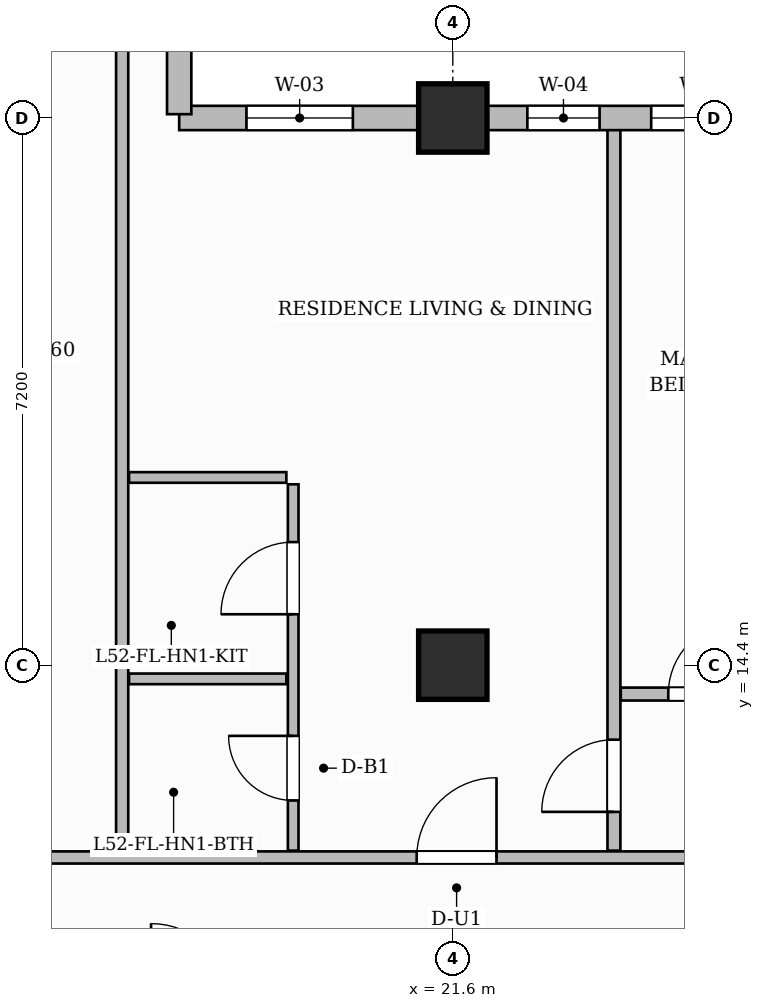
"""IFC4 building model, lengths in metres.
Left out: names, types, materials, properties, quantities, classifications, styles, units other than length and angle.
Written with IfcOpenShell. Run it as: python <this file> out.ifc"""

import sys

from ifc_helpers import new_model, si_unit, direction, frame, frame_2d, origin, origin_2d, place, context, subcontext, project, spatial, rectangle, extrude, source, transform, mapped, element, fill, save


model = new_model("IFC4")
c1 = context("Model", 3, precision=1e-05, world=origin(), true_north=direction((0.0, 1.0)))
c2 = subcontext(c1, "Body", "Model", "MODEL_VIEW")
j1 = project(units=[si_unit("LENGTHUNIT", "METRE"), si_unit("PLANEANGLEUNIT", "RADIAN")], contexts=[c1])
p1 = place(None, origin())
s1 = spatial("IfcSite", under=j1, at=p1, CompositionType="ELEMENT")
p2 = place(p1, origin())
s2 = spatial("IfcBuilding", under=s1, at=p2, CompositionType="ELEMENT")
p3 = place(p2, frame((0.0, 0.0, 209.6)))
s3 = spatial("IfcBuildingStorey", under=s2, at=p3, CompositionType="ELEMENT", Elevation=209.6)
m1 = source(origin(), c2, "Body", "SweptSolid", [
    extrude(rectangle(XDim=0.9, YDim=0.9, at=origin_2d()), origin(), (0.0, 0.0, 1.0), 3.85),
])
for number, where, z_axis, x_axis in (
    (1, (21.6, 14.4, 0.0), (0.0, 0.0, 1.0), (1.0, 0.0, 0.0)),
    (2, (21.6, 21.6, 0.0), (0.0, 0.0, 1.0), (1.0, 0.0, 0.0)),
):
    element("IfcColumn", number, at=place(p3, frame(where, z_axis=z_axis, x_axis=x_axis)), inside=s3, PredefinedType="COLUMN", context=c2, shape_type="MappedRepresentation", body=[
        mapped(m1, transform((0.0, 0.0, 0.0), scale=1.0)),
    ])
p4 = place(p3, frame((14.568, 11.87, 0.0), z_axis=(0.0, 0.0, 1.0), x_axis=(1.0, 0.0, 0.0)))
e3 = element("IfcWall", 3, at=p4, inside=s3, PredefinedType="PARTITIONING", context=c2, shape_type="SweptSolid", body=[
    extrude(rectangle(XDim=15.542, YDim=0.16, at=frame_2d((7.771, 0.0))), origin(), (0.0, 0.0, 1.0), 3.6),
])
p5 = place(p4, frame((6.557, 0.0, 0.0)))
e4 = element("IfcOpeningElement", 4, at=p5, cuts=e3, PredefinedType="OPENING", context=c2, shape_type="SweptSolid", body=[
    extrude(rectangle(XDim=1.05, YDim=2.25, at=frame_2d((0.525, 1.125))), frame((0.0, 0.09, 0.0), z_axis=(0.0, -1.0, 0.0), x_axis=(1.0, 0.0, 0.0)), (0.0, 0.0, 1.0), 0.18),
])
p6 = place(p3, frame((17.25, 11.96, 0.0), z_axis=(0.0, 0.0, 1.0), x_axis=(0.0, 1.0, 0.0)))
e5 = element("IfcWall", 5, at=p6, inside=s3, PredefinedType="PARTITIONING", context=c2, shape_type="SweptSolid", body=[
    extrude(rectangle(XDim=13.15, YDim=0.16, at=frame_2d((6.575, 0.0))), origin(), (0.0, 0.0, 1.0), 3.6),
])
p7 = place(p3, frame((19.5, 11.96, 0.0), z_axis=(0.0, 0.0, 1.0), x_axis=(0.0, 1.0, 0.0)))
e6 = element("IfcWall", 6, at=p7, inside=s3, PredefinedType="PARTITIONING", context=c2, shape_type="SweptSolid", body=[
    extrude(rectangle(XDim=4.82, YDim=0.14, at=frame_2d((2.41, 0.0))), origin(), (0.0, 0.0, 1.0), 3.6),
])
p8 = place(p7, frame((0.66, 0.0, 0.0)))
e7 = element("IfcOpeningElement", 7, at=p8, cuts=e6, PredefinedType="OPENING", context=c2, shape_type="SweptSolid", body=[
    extrude(rectangle(XDim=0.85, YDim=2.1, at=frame_2d((0.425, 1.05))), frame((0.0, 0.08, 0.0), z_axis=(0.0, -1.0, 0.0), x_axis=(1.0, 0.0, 0.0)), (0.0, 0.0, 1.0), 0.16),
])
p9 = place(p7, frame((3.11, 0.0, 0.0)))
e8 = element("IfcOpeningElement", 8, at=p9, cuts=e6, PredefinedType="OPENING", context=c2, shape_type="SweptSolid", body=[
    extrude(rectangle(XDim=0.95, YDim=2.15, at=frame_2d((0.475, 1.075))), frame((0.0, 0.08, 0.0), z_axis=(0.0, -1.0, 0.0), x_axis=(1.0, 0.0, 0.0)), (0.0, 0.0, 1.0), 0.16),
])
p10 = place(p3, frame((17.34, 14.22, 0.0), z_axis=(0.0, 0.0, 1.0), x_axis=(1.0, 0.0, 0.0)))
e9 = element("IfcWall", 9, at=p10, inside=s3, PredefinedType="PARTITIONING", context=c2, shape_type="SweptSolid", body=[
    extrude(rectangle(XDim=2.07, YDim=0.14, at=frame_2d((1.035, 0.0))), origin(), (0.0, 0.0, 1.0), 3.085),
])
p11 = place(p3, frame((17.34, 16.87, 0.0), z_axis=(0.0, 0.0, 1.0), x_axis=(1.0, 0.0, 0.0)))
e10 = element("IfcWall", 10, at=p11, inside=s3, PredefinedType="PARTITIONING", context=c2, shape_type="SweptSolid", body=[
    extrude(rectangle(XDim=2.07, YDim=0.14, at=frame_2d((1.035, 0.0))), origin(), (0.0, 0.0, 1.0), 3.6),
])
p12 = place(p3, frame((23.72, 11.96, 0.0), z_axis=(0.0, 0.0, 1.0), x_axis=(0.0, 1.0, 0.0)))
e11 = element("IfcWall", 11, at=p12, inside=s3, PredefinedType="PARTITIONING", context=c2, shape_type="SweptSolid", body=[
    extrude(rectangle(XDim=9.5, YDim=0.17, at=frame_2d((4.75, 0.0))), origin(), (0.0, 0.0, 1.0), 3.6),
])
p13 = place(p12, frame((0.51, 0.0, 0.0)))
e12 = element("IfcOpeningElement", 12, at=p13, cuts=e11, PredefinedType="OPENING", context=c2, shape_type="SweptSolid", body=[
    extrude(rectangle(XDim=0.95, YDim=2.15, at=frame_2d((0.475, 1.075))), frame((0.0, 0.095, 0.0), z_axis=(0.0, -1.0, 0.0), x_axis=(1.0, 0.0, 0.0)), (0.0, 0.0, 1.0), 0.19),
])
p14 = place(p3, frame((23.81, 14.02, 0.0), z_axis=(0.0, 0.0, 1.0), x_axis=(1.0, 0.0, 0.0)))
e13 = element("IfcWall", 13, at=p14, inside=s3, PredefinedType="PARTITIONING", context=c2, shape_type="SweptSolid", body=[
    extrude(rectangle(XDim=6.3, YDim=0.17, at=frame_2d((3.15, 0.0))), origin(), (0.0, 0.0, 1.0), 3.6),
])
p15 = place(p14, frame((0.625, 0.0, 0.0)))
e14 = element("IfcOpeningElement", 14, at=p15, cuts=e13, PredefinedType="OPENING", context=c2, shape_type="SweptSolid", body=[
    extrude(rectangle(XDim=0.95, YDim=2.15, at=frame_2d((0.475, 1.075))), frame((0.0, 0.095, 0.0), z_axis=(0.0, -1.0, 0.0), x_axis=(1.0, 0.0, 0.0)), (0.0, 0.0, 1.0), 0.19),
])
p16 = place(p14, frame((2.815, 0.0, 0.0)))
e15 = element("IfcOpeningElement", 15, at=p16, cuts=e13, PredefinedType="OPENING", context=c2, shape_type="SweptSolid", body=[
    extrude(rectangle(XDim=0.95, YDim=2.15, at=frame_2d((0.475, 1.075))), frame((0.0, 0.095, 0.0), z_axis=(0.0, -1.0, 0.0), x_axis=(1.0, 0.0, 0.0)), (0.0, 0.0, 1.0), 0.19),
])
p17 = place(p3, frame((18.0, 21.6, 0.0), z_axis=(0.0, 0.0, 1.0), x_axis=(1.0, 0.0, 0.0)))
e16 = element("IfcWall", 16, at=p17, inside=s3, PredefinedType="SOLIDWALL", context=c2, shape_type="SweptSolid", body=[
    extrude(rectangle(XDim=31.8, YDim=0.32, at=frame_2d((15.9, 0.0))), origin(), (0.0, 0.0, 1.0), 3.085),
])
p18 = place(p17, frame((0.885, 0.0, 0.8)))
e17 = element("IfcOpeningElement", 17, at=p18, cuts=e16, PredefinedType="OPENING", context=c2, shape_type="SweptSolid", body=[
    extrude(rectangle(XDim=1.4, YDim=1.85, at=frame_2d((0.7, 0.925))), frame((0.0, 0.17, 0.0), z_axis=(0.0, -1.0, 0.0), x_axis=(1.0, 0.0, 0.0)), (0.0, 0.0, 1.0), 0.34),
])
p19 = place(p17, frame((4.581, 0.0, 0.8)))
e18 = element("IfcOpeningElement", 18, at=p19, cuts=e16, PredefinedType="OPENING", context=c2, shape_type="SweptSolid", body=[
    extrude(rectangle(XDim=0.95, YDim=1.75, at=frame_2d((0.475, 0.875))), frame((0.0, 0.17, 0.0), z_axis=(0.0, -1.0, 0.0), x_axis=(1.0, 0.0, 0.0)), (0.0, 0.0, 1.0), 0.34),
])
p20 = place(p17, frame((6.21, 0.0, 0.8)))
e19 = element("IfcOpeningElement", 19, at=p20, cuts=e16, PredefinedType="OPENING", context=c2, shape_type="SweptSolid", body=[
    extrude(rectangle(XDim=1.4, YDim=1.85, at=frame_2d((0.7, 0.925))), frame((0.0, 0.17, 0.0), z_axis=(0.0, -1.0, 0.0), x_axis=(1.0, 0.0, 0.0)), (0.0, 0.0, 1.0), 0.34),
])
p21 = place(p17, frame((8.48, 0.0, 0.8)))
e20 = element("IfcOpeningElement", 20, at=p21, cuts=e16, PredefinedType="OPENING", context=c2, shape_type="SweptSolid", body=[
    extrude(rectangle(XDim=1.15, YDim=1.8, at=frame_2d((0.575, 0.9))), frame((0.0, 0.17, 0.0), z_axis=(0.0, -1.0, 0.0), x_axis=(1.0, 0.0, 0.0)), (0.0, 0.0, 1.0), 0.34),
])
p22 = place(p17, frame((12.95, 0.0, 0.8)))
e21 = element("IfcOpeningElement", 21, at=p22, cuts=e16, PredefinedType="OPENING", context=c2, shape_type="SweptSolid", body=[
    extrude(rectangle(XDim=1.8, YDim=1.85, at=frame_2d((0.9, 0.925))), frame((0.0, 0.17, 0.0), z_axis=(0.0, -1.0, 0.0), x_axis=(1.0, 0.0, 0.0)), (0.0, 0.0, 1.0), 0.34),
])
p23 = place(p17, frame((18.596, 0.0, 0.8)))
e22 = element("IfcOpeningElement", 22, at=p23, cuts=e16, PredefinedType="OPENING", context=c2, shape_type="SweptSolid", body=[
    extrude(rectangle(XDim=1.8, YDim=1.85, at=frame_2d((0.9, 0.925))), frame((0.0, 0.17, 0.0), z_axis=(0.0, -1.0, 0.0), x_axis=(1.0, 0.0, 0.0)), (0.0, 0.0, 1.0), 0.34),
])
p24 = place(p17, frame((21.729, 0.0, 0.8)))
e23 = element("IfcOpeningElement", 23, at=p24, cuts=e16, PredefinedType="OPENING", context=c2, shape_type="SweptSolid", body=[
    extrude(rectangle(XDim=1.15, YDim=1.8, at=frame_2d((0.575, 0.9))), frame((0.0, 0.17, 0.0), z_axis=(0.0, -1.0, 0.0), x_axis=(1.0, 0.0, 0.0)), (0.0, 0.0, 1.0), 0.34),
])
p25 = place(p17, frame((25.121, 0.0, 0.8)))
e24 = element("IfcOpeningElement", 24, at=p25, cuts=e16, PredefinedType="OPENING", context=c2, shape_type="SweptSolid", body=[
    extrude(rectangle(XDim=0.95, YDim=1.75, at=frame_2d((0.475, 0.875))), frame((0.0, 0.17, 0.0), z_axis=(0.0, -1.0, 0.0), x_axis=(1.0, 0.0, 0.0)), (0.0, 0.0, 1.0), 0.34),
])
p26 = place(p17, frame((27.804, 0.0, 0.8)))
e25 = element("IfcOpeningElement", 25, at=p26, cuts=e16, PredefinedType="OPENING", context=c2, shape_type="SweptSolid", body=[
    extrude(rectangle(XDim=1.8, YDim=1.85, at=frame_2d((0.9, 0.925))), frame((0.0, 0.17, 0.0), z_axis=(0.0, -1.0, 0.0), x_axis=(1.0, 0.0, 0.0)), (0.0, 0.0, 1.0), 0.34),
])
p27 = place(p3, frame((18.0, 21.65, 0.0), z_axis=(0.0, 0.0, 1.0), x_axis=(0.0, 1.0, 0.0)))
e26 = element("IfcWall", 26, at=p27, inside=s3, PredefinedType="SOLIDWALL", context=c2, shape_type="SweptSolid", body=[
    extrude(rectangle(XDim=25.1, YDim=0.32, at=frame_2d((12.55, 0.0))), origin(), (0.0, 0.0, 1.0), 3.6),
])
p28 = place(p27, frame((12.706, 0.0, 0.0)))
e27 = element("IfcOpeningElement", 27, at=p28, cuts=e26, PredefinedType="OPENING", context=c2, shape_type="SweptSolid", body=[
    extrude(rectangle(XDim=1.2, YDim=2.2, at=frame_2d((0.6, 1.1))), frame((0.0, 0.17, 0.0), z_axis=(0.0, -1.0, 0.0), x_axis=(1.0, 0.0, 0.0)), (0.0, 0.0, 1.0), 0.34),
])
p29 = place(p27, frame((1.89, 0.0, 0.8)))
e28 = element("IfcOpeningElement", 28, at=p29, cuts=e26, PredefinedType="OPENING", context=c2, shape_type="SweptSolid", body=[
    extrude(rectangle(XDim=1.8, YDim=1.85, at=frame_2d((0.9, 0.925))), frame((0.0, 0.17, 0.0), z_axis=(0.0, -1.0, 0.0), x_axis=(1.0, 0.0, 0.0)), (0.0, 0.0, 1.0), 0.34),
])
p30 = place(p27, frame((6.63, 0.0, 0.8)))
e29 = element("IfcOpeningElement", 29, at=p30, cuts=e26, PredefinedType="OPENING", context=c2, shape_type="SweptSolid", body=[
    extrude(rectangle(XDim=1.8, YDim=1.85, at=frame_2d((0.9, 0.925))), frame((0.0, 0.17, 0.0), z_axis=(0.0, -1.0, 0.0), x_axis=(1.0, 0.0, 0.0)), (0.0, 0.0, 1.0), 0.34),
])
p31 = place(p27, frame((14.778, 0.0, 0.8)))
e30 = element("IfcOpeningElement", 30, at=p31, cuts=e26, PredefinedType="OPENING", context=c2, shape_type="SweptSolid", body=[
    extrude(rectangle(XDim=1.8, YDim=1.85, at=frame_2d((0.9, 0.925))), frame((0.0, 0.17, 0.0), z_axis=(0.0, -1.0, 0.0), x_axis=(1.0, 0.0, 0.0)), (0.0, 0.0, 1.0), 0.34),
])
p32 = place(p27, frame((19.275, 0.0, 0.8)))
e31 = element("IfcOpeningElement", 31, at=p32, cuts=e26, PredefinedType="OPENING", context=c2, shape_type="SweptSolid", body=[
    extrude(rectangle(XDim=1.8, YDim=1.85, at=frame_2d((0.9, 0.925))), frame((0.0, 0.17, 0.0), z_axis=(0.0, -1.0, 0.0), x_axis=(1.0, 0.0, 0.0)), (0.0, 0.0, 1.0), 0.34),
])
p33 = place(p27, frame((22.025, 0.0, 0.8)))
e32 = element("IfcOpeningElement", 32, at=p33, cuts=e26, PredefinedType="OPENING", context=c2, shape_type="SweptSolid", body=[
    extrude(rectangle(XDim=1.8, YDim=1.85, at=frame_2d((0.9, 0.925))), frame((0.0, 0.17, 0.0), z_axis=(0.0, -1.0, 0.0), x_axis=(1.0, 0.0, 0.0)), (0.0, 0.0, 1.0), 0.34),
])
m2 = source(origin(), c2, "Body", "SweptSolid", [
    extrude(rectangle(XDim=0.85, YDim=2.1, at=frame_2d((0.425, 1.05))), frame((0.0, 0.025, 0.0), z_axis=(0.0, -1.0, 0.0), x_axis=(1.0, 0.0, 0.0)), (0.0, 0.0, 1.0), 0.05),
])
p34 = place(p8, origin())
e33 = element("IfcDoor", 33, at=p34, inside=s3, OperationType="SINGLE_SWING_RIGHT", PredefinedType="DOOR", context=c2, shape_type="MappedRepresentation", body=[
    mapped(m2, transform((0.0, 0.0, 0.0), scale=1.0)),
])
fill(e7, e33)
m3 = source(origin(), c2, "Body", "SweptSolid", [
    extrude(rectangle(XDim=0.95, YDim=2.15, at=frame_2d((0.475, 1.075))), frame((0.0, 0.025, 0.0), z_axis=(0.0, -1.0, 0.0), x_axis=(1.0, 0.0, 0.0)), (0.0, 0.0, 1.0), 0.05),
])
p35 = place(p9, origin())
e34 = element("IfcDoor", 34, at=p35, inside=s3, OperationType="SINGLE_SWING_LEFT", PredefinedType="DOOR", context=c2, shape_type="MappedRepresentation", body=[
    mapped(m3, transform((0.0, 0.0, 0.0), scale=1.0)),
])
fill(e8, e34)
m4 = source(origin(), c2, "Body", "SweptSolid", [
    extrude(rectangle(XDim=1.05, YDim=2.25, at=frame_2d((0.525, 1.125))), frame((0.0, 0.025, 0.0), z_axis=(0.0, -1.0, 0.0), x_axis=(1.0, 0.0, 0.0)), (0.0, 0.0, 1.0), 0.05),
])
p36 = place(p5, origin())
e35 = element("IfcDoor", 35, at=p36, inside=s3, OperationType="SINGLE_SWING_RIGHT", PredefinedType="DOOR", context=c2, shape_type="MappedRepresentation", body=[
    mapped(m4, transform((0.0, 0.0, 0.0), scale=1.0)),
])
fill(e4, e35)
p37 = place(p13, origin())
e36 = element("IfcDoor", 36, at=p37, inside=s3, OperationType="SINGLE_SWING_LEFT", PredefinedType="DOOR", context=c2, shape_type="MappedRepresentation", body=[
    mapped(m3, transform((0.0, 0.0, 0.0), scale=1.0)),
])
fill(e12, e36)
p38 = place(p15, origin())
e37 = element("IfcDoor", 37, at=p38, inside=s3, OperationType="SINGLE_SWING_RIGHT", PredefinedType="DOOR", context=c2, shape_type="MappedRepresentation", body=[
    mapped(m3, transform((0.0, 0.0, 0.0), scale=1.0)),
])
fill(e14, e37)
m5 = source(origin(), c2, "Body", "SweptSolid", [
    extrude(rectangle(XDim=1.4, YDim=1.85, at=frame_2d((0.7, 0.925))), frame((0.0, 0.03, 0.0), z_axis=(0.0, -1.0, 0.0), x_axis=(1.0, 0.0, 0.0)), (0.0, 0.0, 1.0), 0.06),
])
p39 = place(p18, origin())
e38 = element("IfcWindow", 38, at=p39, inside=s3, PartitioningType="SINGLE_PANEL", PredefinedType="WINDOW", context=c2, shape_type="MappedRepresentation", body=[
    mapped(m5, transform((0.0, 0.0, 0.0), scale=1.0)),
])
fill(e17, e38)
m6 = source(origin(), c2, "Body", "SweptSolid", [
    extrude(rectangle(XDim=0.95, YDim=1.75, at=frame_2d((0.475, 0.875))), frame((0.0, 0.03, 0.0), z_axis=(0.0, -1.0, 0.0), x_axis=(1.0, 0.0, 0.0)), (0.0, 0.0, 1.0), 0.06),
])
p40 = place(p19, origin())
e39 = element("IfcWindow", 39, at=p40, inside=s3, PartitioningType="SINGLE_PANEL", PredefinedType="WINDOW", context=c2, shape_type="MappedRepresentation", body=[
    mapped(m6, transform((0.0, 0.0, 0.0), scale=1.0)),
])
fill(e18, e39)
p41 = place(p20, origin())
e40 = element("IfcWindow", 40, at=p41, inside=s3, PartitioningType="SINGLE_PANEL", PredefinedType="WINDOW", context=c2, shape_type="MappedRepresentation", body=[
    mapped(m5, transform((0.0, 0.0, 0.0), scale=1.0)),
])
fill(e19, e40)
save(model, sys.argv[1])
